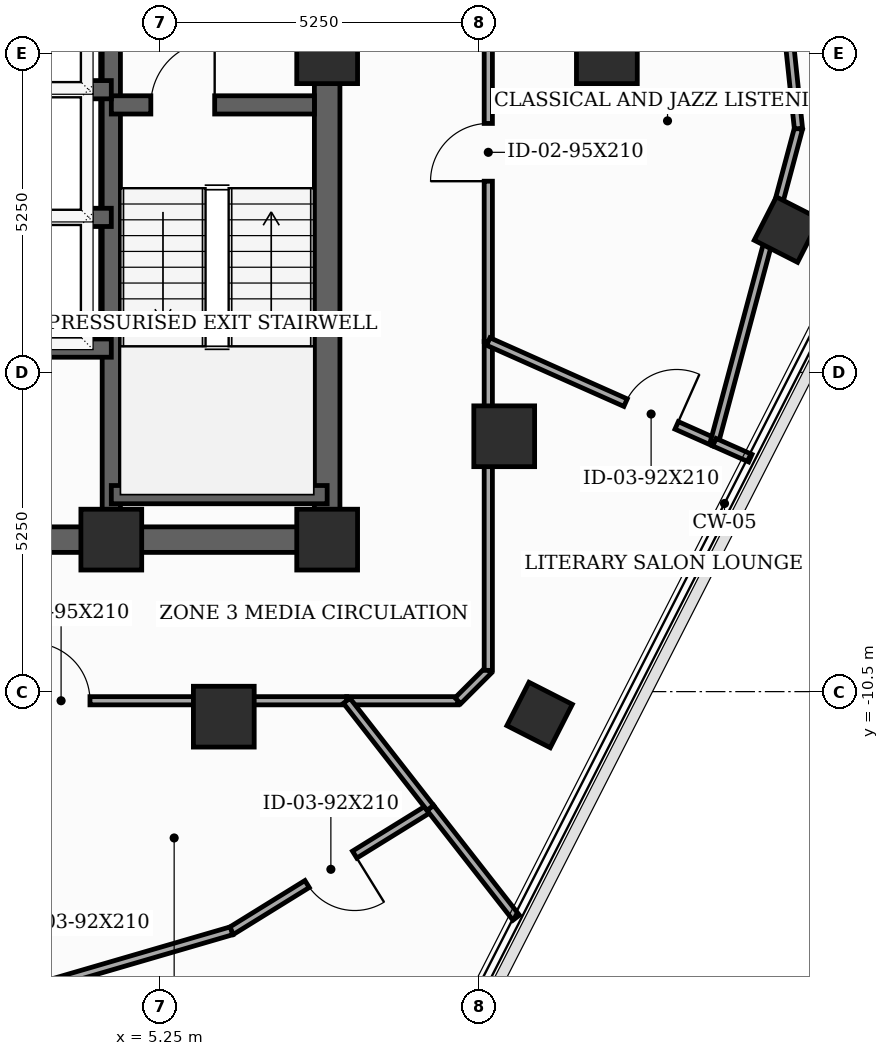
"""IFC4 building model, lengths in metres.
Left out: names, types, materials, properties, quantities, classifications, styles, units other than length and angle.
Written with IfcOpenShell. Run it as: python <this file> out.ifc"""

import sys

from ifc_helpers import new_model, si_unit, direction, frame, frame_2d, origin, origin_2d, place, context, subcontext, project, spatial, rectangle, extrude, element, fill, save


model = new_model("IFC4")
c1 = context("Model", 3, precision=1e-05, world=origin(), true_north=direction((0.0, 1.0)))
c2 = subcontext(c1, "Body", "Model", "MODEL_VIEW")
j1 = project(units=[si_unit("LENGTHUNIT", "METRE"), si_unit("PLANEANGLEUNIT", "RADIAN")], contexts=[c1])
p1 = place(None, origin())
s1 = spatial("IfcSite", under=j1, at=p1, CompositionType="ELEMENT")
p2 = place(p1, origin())
s2 = spatial("IfcBuilding", under=s1, at=p2, CompositionType="ELEMENT")
p3 = place(p2, frame((0.0, 0.0, 255.9)))
s3 = spatial("IfcBuildingStorey", under=s2, at=p3, CompositionType="ELEMENT", Elevation=255.9)
for number, where, z_axis, x_axis in (
    (1, (4.45, -8.0, 0.0), (0.0, 0.0, 1.0), (1.0, 0.0, 0.0)),
    (2, (8.0, -8.0, 0.0), (0.0, 0.0, 1.0), (1.0, 0.0, 0.0)),
    (3, (8.0, 0.0, 0.0), (0.0, 0.0, 1.0), (1.0, 0.0, 0.0)),
    (4, (12.6, 0.0, 0.0), (0.0, 0.0, 1.0), (1.0, 0.0, 0.0)),
    (5, (6.3, -10.912, 0.0), (0.0, 0.0, 1.0), (1.0, 0.0, 0.0)),
    (6, (10.912, -6.3, 0.0), (0.0, 0.0, 1.0), (1.0, 0.0, 0.0)),
):
    element("IfcColumn", number, at=place(p3, frame(where, z_axis=z_axis, x_axis=x_axis)), inside=s3, PredefinedType="COLUMN", context=c2, shape_type="SweptSolid", body=[
        extrude(rectangle(XDim=1.0, YDim=1.0, at=origin_2d()), origin(), (0.0, 0.0, 1.0), 3.7),
    ])
for number, where, z_axis, x_axis in (
    (7, (11.494, -10.885, 0.0), (0.0, 0.0, 1.0), (0.454, 0.891, 0.0)),
    (8, (15.562, -2.901, 0.0), (0.0, 0.0, 1.0), (0.454, 0.891, 0.0)),
):
    element("IfcColumn", number, at=place(p3, frame(where, z_axis=z_axis, x_axis=x_axis)), inside=s3, PredefinedType="COLUMN", context=c2, shape_type="SweptSolid", body=[
        extrude(rectangle(XDim=0.8, YDim=0.8, at=origin_2d()), origin(), (0.0, 0.0, 1.0), 3.7),
    ])
p4 = place(p3, frame((8.0, -8.0, 0.0), z_axis=(0.0, 0.0, 1.0), x_axis=(0.0, 1.0, 0.0)))
e9 = element("IfcWall", 9, at=p4, inside=s3, PredefinedType="SHEAR", context=c2, shape_type="SweptSolid", body=[
    extrude(rectangle(XDim=16.0, YDim=0.42, at=frame_2d((8.0, 0.0))), origin(), (0.0, 0.0, 1.0), 3.5),
])
p5 = place(p4, frame((9.6, 0.0, 0.0)))
e10 = element("IfcOpeningElement", 10, at=p5, cuts=e9, PredefinedType="OPENING", context=c2, shape_type="SweptSolid", body=[
    extrude(rectangle(XDim=1.05, YDim=2.15, at=frame_2d((0.525, 1.075))), frame((0.0, 0.22, 0.0), z_axis=(0.0, -1.0, 0.0), x_axis=(1.0, 0.0, 0.0)), (0.0, 0.0, 1.0), 0.44),
])
p6 = place(p4, frame((14.469, 0.0, 0.0)))
e11 = element("IfcOpeningElement", 11, at=p6, cuts=e9, PredefinedType="OPENING", context=c2, shape_type="SweptSolid", body=[
    extrude(rectangle(XDim=0.85, YDim=2.02, at=frame_2d((0.425, 1.01))), frame((0.0, 0.22, 0.0), z_axis=(0.0, -1.0, 0.0), x_axis=(1.0, 0.0, 0.0)), (0.0, 0.0, 1.0), 0.44),
])
p7 = place(p3, frame((-8.0, -8.0, 0.0), z_axis=(0.0, 0.0, 1.0), x_axis=(1.0, 0.0, 0.0)))
e12 = element("IfcWall", 12, at=p7, inside=s3, PredefinedType="SHEAR", context=c2, shape_type="SweptSolid", body=[
    extrude(rectangle(XDim=16.0, YDim=0.42, at=frame_2d((8.0, 0.0))), origin(), (0.0, 0.0, 1.0), 3.5),
])
p8 = place(p7, frame((5.2, 0.0, 0.0)))
e13 = element("IfcOpeningElement", 13, at=p8, cuts=e12, PredefinedType="OPENING", context=c2, shape_type="SweptSolid", body=[
    extrude(rectangle(XDim=0.95, YDim=2.1, at=frame_2d((0.475, 1.05))), frame((0.0, 0.22, 0.0), z_axis=(0.0, -1.0, 0.0), x_axis=(1.0, 0.0, 0.0)), (0.0, 0.0, 1.0), 0.44),
])
p9 = place(p7, frame((9.8, 0.0, 0.0)))
e14 = element("IfcOpeningElement", 14, at=p9, cuts=e12, PredefinedType="OPENING", context=c2, shape_type="SweptSolid", body=[
    extrude(rectangle(XDim=0.95, YDim=2.1, at=frame_2d((0.475, 1.05))), frame((0.0, 0.22, 0.0), z_axis=(0.0, -1.0, 0.0), x_axis=(1.0, 0.0, 0.0)), (0.0, 0.0, 1.0), 0.44),
])
p10 = place(p3, frame((4.45, -7.79, 0.0), z_axis=(0.0, 0.0, 1.0), x_axis=(0.0, 1.0, 0.0)))
e15 = element("IfcWall", 15, at=p10, inside=s3, PredefinedType="SHEAR", context=c2, shape_type="SweptSolid", body=[
    extrude(rectangle(XDim=15.58, YDim=0.3, at=frame_2d((7.79, 0.0))), origin(), (0.0, 0.0, 1.0), 3.5),
])
p11 = place(p3, frame((4.45, -0.85, 0.0), z_axis=(0.0, 0.0, 1.0), x_axis=(1.0, 0.0, 0.0)))
e16 = element("IfcWall", 16, at=p11, inside=s3, PredefinedType="SHEAR", context=c2, shape_type="SweptSolid", body=[
    extrude(rectangle(XDim=3.34, YDim=0.3, at=frame_2d((1.67, 0.0))), origin(), (0.0, 0.0, 1.0), 3.5),
])
p12 = place(p11, frame((0.65, 0.0, 0.0)))
e17 = element("IfcOpeningElement", 17, at=p12, cuts=e16, PredefinedType="OPENING", context=c2, shape_type="SweptSolid", body=[
    extrude(rectangle(XDim=1.05, YDim=2.15, at=frame_2d((0.525, 1.075))), frame((0.0, 0.16, 0.0), z_axis=(0.0, -1.0, 0.0), x_axis=(1.0, 0.0, 0.0)), (0.0, 0.0, 1.0), 0.32),
])
p13 = place(p3, frame((4.45, -7.26, 0.0), z_axis=(0.0, 0.0, 1.0), x_axis=(1.0, 0.0, 0.0)))
e18 = element("IfcWall", 18, at=p13, inside=s3, PredefinedType="SHEAR", context=c2, shape_type="SweptSolid", body=[
    extrude(rectangle(XDim=3.55, YDim=0.3, at=frame_2d((1.775, 0.0))), origin(), (0.0, 0.0, 1.0), 3.5),
])
p14 = place(p3, frame((-4.45, -4.85, 0.0), z_axis=(0.0, 0.0, 1.0), x_axis=(1.0, 0.0, 0.0)))
e19 = element("IfcWall", 19, at=p14, inside=s3, PredefinedType="SHEAR", context=c2, shape_type="SweptSolid", body=[
    extrude(rectangle(XDim=8.9, YDim=0.3, at=frame_2d((4.45, 0.0))), origin(), (0.0, 0.0, 1.0), 3.5),
])
for number, where, z_axis, x_axis in (
    (20, (1.68, -2.7, 0.0), (0.0, 0.0, 1.0), (1.0, 0.0, 0.0)),
    (21, (1.68, -0.6, 0.0), (0.0, 0.0, 1.0), (1.0, 0.0, 0.0)),
):
    element("IfcWall", number, at=place(p3, frame(where, z_axis=z_axis, x_axis=x_axis)), inside=s3, PredefinedType="SHEAR", context=c2, shape_type="SweptSolid", body=[
        extrude(rectangle(XDim=2.77, YDim=0.3, at=frame_2d((1.385, 0.0))), origin(), (0.0, 0.0, 1.0), 3.5),
    ])
p15 = place(p3, frame((10.65, -4.742, 0.0), z_axis=(0.0, 0.0, 1.0), x_axis=(0.0, 1.0, 0.0)))
e22 = element("IfcWall", 22, at=p15, inside=s3, PredefinedType="PARTITIONING", context=c2, shape_type="SweptSolid", body=[
    extrude(rectangle(XDim=6.224, YDim=0.135, at=frame_2d((3.112, 0.0))), origin(), (0.0, 0.0, 1.0), 2.885),
])
p16 = place(p15, frame((2.637, 0.0, 0.0)))
e23 = element("IfcOpeningElement", 23, at=p16, cuts=e22, PredefinedType="OPENING", context=c2, shape_type="SweptSolid", body=[
    extrude(rectangle(XDim=0.95, YDim=2.1, at=frame_2d((0.475, 1.05))), frame((0.0, 0.077, 0.0), z_axis=(0.0, -1.0, 0.0), x_axis=(1.0, 0.0, 0.0)), (0.0, 0.0, 1.0), 0.155),
])
p17 = place(p3, frame((2.45, -10.65, 0.0), z_axis=(0.0, 0.0, 1.0), x_axis=(1.0, 0.0, 0.0)))
e24 = element("IfcWall", 24, at=p17, inside=s3, PredefinedType="PARTITIONING", context=c2, shape_type="SweptSolid", body=[
    extrude(rectangle(XDim=5.871, YDim=0.135, at=frame_2d((2.936, 0.0))), origin(), (0.0, 0.0, 1.0), 2.885),
])
p18 = place(p17, frame((0.699, 0.0, 0.0)))
e25 = element("IfcOpeningElement", 25, at=p18, cuts=e24, PredefinedType="OPENING", context=c2, shape_type="SweptSolid", body=[
    extrude(rectangle(XDim=0.95, YDim=2.1, at=frame_2d((0.475, 1.05))), frame((0.0, 0.077, 0.0), z_axis=(0.0, -1.0, 0.0), x_axis=(1.0, 0.0, 0.0)), (0.0, 0.0, 1.0), 0.155),
])
p19 = place(p3, frame((8.321, -10.65, 0.0), z_axis=(0.0, 0.0, 1.0), x_axis=(1.0, 0.0, 0.0)))
e26 = element("IfcWall", 26, at=p19, inside=s3, PredefinedType="PARTITIONING", context=c2, shape_type="SweptSolid", body=[
    extrude(rectangle(XDim=1.829, YDim=0.135, at=frame_2d((0.915, 0.0))), origin(), (0.0, 0.0, 1.0), 3.5),
])
p20 = place(p3, frame((10.15, -10.65, 0.0), z_axis=(0.0, 0.0, 1.0), x_axis=(0.707106781187, 0.707106781187, 0.0)))
e27 = element("IfcWall", 27, at=p20, inside=s3, PredefinedType="PARTITIONING", context=c2, shape_type="SweptSolid", body=[
    extrude(rectangle(XDim=0.707, YDim=0.135, at=frame_2d((0.354, 0.0))), origin(), (0.0, 0.0, 1.0), 3.5),
])
p21 = place(p3, frame((10.65, -10.15, 0.0), z_axis=(0.0, 0.0, 1.0), x_axis=(0.0, 1.0, 0.0)))
e28 = element("IfcWall", 28, at=p21, inside=s3, PredefinedType="PARTITIONING", context=c2, shape_type="SweptSolid", body=[
    extrude(rectangle(XDim=5.408, YDim=0.135, at=frame_2d((2.704, 0.0))), origin(), (0.0, 0.0, 1.0), 2.885),
])
p22 = place(p3, frame((10.65, -4.742, 0.0), z_axis=(0.0, 0.0, 1.0), x_axis=(0.913526929547, -0.406778255309, 0.0)))
e29 = element("IfcWall", 29, at=p22, inside=s3, PredefinedType="PARTITIONING", context=c2, shape_type="SweptSolid", body=[
    extrude(rectangle(XDim=4.071, YDim=0.135, at=frame_2d((2.036, 0.0))), origin(), (0.0, 0.0, 1.0), 2.885),
])
p23 = place(p22, frame((2.471, 0.0, 0.0)))
e30 = element("IfcOpeningElement", 30, at=p23, cuts=e29, PredefinedType="OPENING", context=c2, shape_type="SweptSolid", body=[
    extrude(rectangle(XDim=0.92, YDim=2.1, at=frame_2d((0.46, 1.05))), frame((0.0, 0.077, 0.0), z_axis=(0.0, -1.0, 0.0), x_axis=(1.0, 0.0, 0.0)), (0.0, 0.0, 1.0), 0.155),
])
p24 = place(p3, frame((14.369, -6.398, 0.0), z_axis=(0.0, 0.0, 1.0), x_axis=(0.258820640976, 0.965925398675, 0.0)))
e31 = element("IfcWall", 31, at=p24, inside=s3, PredefinedType="PARTITIONING", context=c2, shape_type="SweptSolid", body=[
    extrude(rectangle(XDim=5.34, YDim=0.135, at=frame_2d((2.67, 0.0))), origin(), (0.0, 0.0, 1.0), 3.035),
])
p25 = place(p3, frame((15.751, -1.24, 0.0), z_axis=(0.0, 0.0, 1.0), x_axis=(-0.104547955553, 0.994519846453, 0.0)))
e32 = element("IfcWall", 32, at=p25, inside=s3, PredefinedType="PARTITIONING", context=c2, shape_type="SweptSolid", body=[
    extrude(rectangle(XDim=5.759, YDim=0.135, at=frame_2d((2.879, 0.0))), origin(), (0.0, 0.0, 1.0), 3.035),
])
p26 = place(p25, frame((2.419, 0.0, 0.0)))
e33 = element("IfcOpeningElement", 33, at=p26, cuts=e32, PredefinedType="OPENING", context=c2, shape_type="SweptSolid", body=[
    extrude(rectangle(XDim=0.92, YDim=2.1, at=frame_2d((0.46, 1.05))), frame((0.0, 0.077, 0.0), z_axis=(0.0, -1.0, 0.0), x_axis=(1.0, 0.0, 0.0)), (0.0, 0.0, 1.0), 0.155),
])
p27 = place(p3, frame((9.696, -12.411, 0.0), z_axis=(0.0, 0.0, 1.0), x_axis=(-0.850393663863, -0.526146953295, 0.0)))
e34 = element("IfcWall", 34, at=p27, inside=s3, PredefinedType="PARTITIONING", context=c2, shape_type="SweptSolid", body=[
    extrude(rectangle(XDim=3.845, YDim=0.135, at=frame_2d((1.923, 0.0))), origin(), (0.0, 0.0, 1.0), 3.035),
])
p28 = place(p27, frame((1.463, 0.0, 0.0)))
e35 = element("IfcOpeningElement", 35, at=p28, cuts=e34, PredefinedType="OPENING", context=c2, shape_type="SweptSolid", body=[
    extrude(rectangle(XDim=0.92, YDim=2.1, at=frame_2d((0.46, 1.05))), frame((0.0, 0.077, 0.0), z_axis=(0.0, -1.0, 0.0), x_axis=(1.0, 0.0, 0.0)), (0.0, 0.0, 1.0), 0.155),
])
p29 = place(p3, frame((6.426, -14.434, 0.0), z_axis=(0.0, 0.0, 1.0), x_axis=(-0.960041241254, -0.279858562654, 0.0)))
e36 = element("IfcWall", 36, at=p29, inside=s3, PredefinedType="PARTITIONING", context=c2, shape_type="SweptSolid", body=[
    extrude(rectangle(XDim=3.844, YDim=0.135, at=frame_2d((1.922, 0.0))), origin(), (0.0, 0.0, 1.0), 3.185),
])
p30 = place(p3, frame((11.108, -14.218, 0.0), z_axis=(0.0, 0.0, 1.0), x_axis=(-0.615736984334, 0.787951753677, 0.0)))
e37 = element("IfcWall", 37, at=p30, inside=s3, PredefinedType="PARTITIONING", context=c2, shape_type="SweptSolid", body=[
    extrude(rectangle(XDim=2.294, YDim=0.135, at=frame_2d((1.147, 0.0))), origin(), (0.0, 0.0, 1.0), 3.035),
])
p31 = place(p3, frame((9.696, -12.411, 0.0), z_axis=(0.0, 0.0, 1.0), x_axis=(-0.615429845305, 0.788191668002, 0.0)))
e38 = element("IfcWall", 38, at=p31, inside=s3, PredefinedType="PARTITIONING", context=c2, shape_type="SweptSolid", body=[
    extrude(rectangle(XDim=2.234, YDim=0.135, at=frame_2d((1.117, 0.0))), origin(), (0.0, 0.0, 1.0), 3.5),
])
p32 = place(p3, frame((14.959, -6.66, 0.0), z_axis=(0.0, 0.0, 1.0), x_axis=(-0.913967286969, 0.405787873586, 0.0)))
e39 = element("IfcWall", 39, at=p32, inside=s3, PredefinedType="PARTITIONING", context=c2, shape_type="SweptSolid", body=[
    extrude(rectangle(XDim=0.646, YDim=0.135, at=frame_2d((0.323, 0.0))), origin(), (0.0, 0.0, 1.0), 3.5),
])
p33 = place(p12, origin())
e40 = element("IfcDoor", 40, at=p33, inside=s3, OperationType="SINGLE_SWING_RIGHT", PredefinedType="DOOR", context=c2, shape_type="SweptSolid", body=[
    extrude(rectangle(XDim=1.05, YDim=2.15, at=frame_2d((0.525, 1.075))), frame((0.0, 0.025, 0.0), z_axis=(0.0, -1.0, 0.0), x_axis=(1.0, 0.0, 0.0)), (0.0, 0.0, 1.0), 0.05),
])
fill(e17, e40)
p34 = place(p16, origin())
e41 = element("IfcDoor", 41, at=p34, inside=s3, OperationType="SINGLE_SWING_LEFT", PredefinedType="DOOR", context=c2, shape_type="SweptSolid", body=[
    extrude(rectangle(XDim=0.95, YDim=2.1, at=frame_2d((0.475, 1.05))), frame((0.0, 0.025, 0.0), z_axis=(0.0, -1.0, 0.0), x_axis=(1.0, 0.0, 0.0)), (0.0, 0.0, 1.0), 0.05),
])
fill(e23, e41)
p35 = place(p18, origin())
e42 = element("IfcDoor", 42, at=p35, inside=s3, OperationType="SINGLE_SWING_LEFT", PredefinedType="DOOR", context=c2, shape_type="SweptSolid", body=[
    extrude(rectangle(XDim=0.95, YDim=2.1, at=frame_2d((0.475, 1.05))), frame((0.0, 0.025, 0.0), z_axis=(0.0, -1.0, 0.0), x_axis=(1.0, 0.0, 0.0)), (0.0, 0.0, 1.0), 0.05),
])
fill(e25, e42)
p36 = place(p23, origin())
e43 = element("IfcDoor", 43, at=p36, inside=s3, OperationType="SINGLE_SWING_RIGHT", PredefinedType="DOOR", context=c2, shape_type="SweptSolid", body=[
    extrude(rectangle(XDim=0.92, YDim=2.1, at=frame_2d((0.46, 1.05))), frame((0.0, 0.025, 0.0), z_axis=(0.0, -1.0, 0.0), x_axis=(1.0, 0.0, 0.0)), (0.0, 0.0, 1.0), 0.05),
])
fill(e30, e43)
p37 = place(p28, origin())
e44 = element("IfcDoor", 44, at=p37, inside=s3, OperationType="SINGLE_SWING_LEFT", PredefinedType="DOOR", context=c2, shape_type="SweptSolid", body=[
    extrude(rectangle(XDim=0.92, YDim=2.1, at=frame_2d((0.46, 1.05))), frame((0.0, 0.025, 0.0), z_axis=(0.0, -1.0, 0.0), x_axis=(1.0, 0.0, 0.0)), (0.0, 0.0, 1.0), 0.05),
])
fill(e35, e44)
save(model, sys.argv[1])
